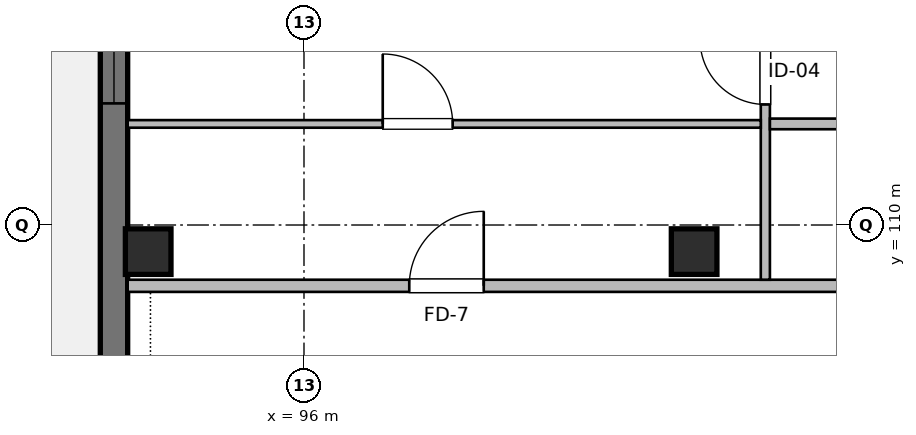
"""IFC4 building model, lengths in metres.
Left out: names, types, materials, properties, quantities, classifications, styles, units other than length and angle.
Written with IfcOpenShell. Run it as: python <this file> out.ifc"""

import sys

from ifc_helpers import new_model, si_unit, direction, frame, frame_2d, origin, origin_2d, place, context, subcontext, project, spatial, rectangle, extrude, element, fill, save


model = new_model("IFC4")
c1 = context("Model", 3, precision=1e-05, world=origin(), true_north=direction((0.0, 1.0)))
c2 = subcontext(c1, "Body", "Model", "MODEL_VIEW")
j1 = project(units=[si_unit("LENGTHUNIT", "METRE"), si_unit("PLANEANGLEUNIT", "RADIAN")], contexts=[c1])
p1 = place(None, origin())
s1 = spatial("IfcSite", under=j1, at=p1, CompositionType="ELEMENT")
p2 = place(p1, origin())
s2 = spatial("IfcBuilding", under=s1, at=p2, CompositionType="ELEMENT")
p3 = place(p2, frame((0.0, 0.0, 10.56)))
s3 = spatial("IfcBuildingStorey", under=s2, at=p3, CompositionType="ELEMENT", Elevation=10.56)
for number, where, z_axis, x_axis in (
    (1, (93.95, 109.65, 0.0), (0.0, 0.0, 1.0), (1.0, 0.0, 0.0)),
    (2, (101.133, 109.65, 0.0), (0.0, 0.0, 1.0), (1.0, 0.0, 0.0)),
):
    element("IfcColumn", number, at=place(p3, frame(where, z_axis=z_axis, x_axis=x_axis)), inside=s3, PredefinedType="COLUMN", context=c2, shape_type="SweptSolid", body=[
        extrude(rectangle(XDim=0.6, YDim=0.6, at=origin_2d()), origin(), (0.0, 0.0, 1.0), 3.2),
    ])
p4 = place(p3, frame((93.5, 100.0, 0.0), z_axis=(0.0, 0.0, 1.0), x_axis=(0.0, 1.0, 0.0)))
e3 = element("IfcWall", 3, at=p4, inside=s3, PredefinedType="SHEAR", context=c2, shape_type="SweptSolid", body=[
    extrude(rectangle(XDim=16.0, YDim=0.36, at=frame_2d((8.0, 0.0))), origin(), (0.0, 0.0, 1.0), 2.98),
])
p5 = place(p4, frame((3.4, 0.0, 0.0)))
e4 = element("IfcOpeningElement", 4, at=p5, cuts=e3, PredefinedType="OPENING", context=c2, shape_type="SweptSolid", body=[
    extrude(rectangle(XDim=1.2, YDim=2.2, at=frame_2d((0.6, 1.1))), frame((0.0, 0.19, 0.0), z_axis=(0.0, -1.0, 0.0), x_axis=(1.0, 0.0, 0.0)), (0.0, 0.0, 1.0), 0.38),
])
p6 = place(p4, frame((4.85, 0.0, 0.72)))
e5 = element("IfcOpeningElement", 5, at=p6, cuts=e3, PredefinedType="OPENING", context=c2, shape_type="SweptSolid", body=[
    extrude(rectangle(XDim=1.8, YDim=1.5, at=frame_2d((0.9, 0.75))), frame((0.0, 0.19, 0.0), z_axis=(0.0, -1.0, 0.0), x_axis=(1.0, 0.0, 0.0)), (0.0, 0.0, 1.0), 0.38),
])
p7 = place(p4, frame((11.6, 0.0, 0.72)))
e6 = element("IfcOpeningElement", 6, at=p7, cuts=e3, PredefinedType="OPENING", context=c2, shape_type="SweptSolid", body=[
    extrude(rectangle(XDim=1.7, YDim=1.5, at=frame_2d((0.85, 0.75))), frame((0.0, 0.19, 0.0), z_axis=(0.0, -1.0, 0.0), x_axis=(1.0, 0.0, 0.0)), (0.0, 0.0, 1.0), 0.38),
])
p8 = place(p3, frame((93.68, 109.2, 0.0), z_axis=(0.0, 0.0, 1.0), x_axis=(1.0, 0.0, 0.0)))
e7 = element("IfcWall", 7, at=p8, inside=s3, PredefinedType="PARTITIONING", context=c2, shape_type="SweptSolid", body=[
    extrude(rectangle(XDim=43.64, YDim=0.16, at=frame_2d((21.82, 0.0))), origin(), (0.0, 0.0, 1.0), 2.935),
])
p9 = place(p8, frame((3.705, 0.0, 0.0)))
e8 = element("IfcOpeningElement", 8, at=p9, cuts=e7, PredefinedType="OPENING", context=c2, shape_type="SweptSolid", body=[
    extrude(rectangle(XDim=0.98, YDim=2.15, at=frame_2d((0.49, 1.075))), frame((0.0, 0.09, 0.0), z_axis=(0.0, -1.0, 0.0), x_axis=(1.0, 0.0, 0.0)), (0.0, 0.0, 1.0), 0.18),
])
p10 = place(p8, frame((18.315, 0.0, 0.0)))
e9 = element("IfcOpeningElement", 9, at=p10, cuts=e7, PredefinedType="OPENING", context=c2, shape_type="SweptSolid", body=[
    extrude(rectangle(XDim=0.98, YDim=2.15, at=frame_2d((0.49, 1.075))), frame((0.0, 0.09, 0.0), z_axis=(0.0, -1.0, 0.0), x_axis=(1.0, 0.0, 0.0)), (0.0, 0.0, 1.0), 0.18),
])
p11 = place(p8, frame((32.885, 0.0, 0.0)))
e10 = element("IfcOpeningElement", 10, at=p11, cuts=e7, PredefinedType="OPENING", context=c2, shape_type="SweptSolid", body=[
    extrude(rectangle(XDim=0.98, YDim=2.15, at=frame_2d((0.49, 1.075))), frame((0.0, 0.09, 0.0), z_axis=(0.0, -1.0, 0.0), x_axis=(1.0, 0.0, 0.0)), (0.0, 0.0, 1.0), 0.18),
])
p12 = place(p3, frame((102.07, 109.28, 0.0), z_axis=(0.0, 0.0, 1.0), x_axis=(0.0, 1.0, 0.0)))
e11 = element("IfcWall", 11, at=p12, inside=s3, PredefinedType="PARTITIONING", context=c2, shape_type="SweptSolid", body=[
    extrude(rectangle(XDim=6.6, YDim=0.12, at=frame_2d((3.3, 0.0))), origin(), (0.0, 0.0, 1.0), 2.935),
])
p13 = place(p12, frame((2.306, 0.0, 0.0)))
e12 = element("IfcOpeningElement", 12, at=p13, cuts=e11, PredefinedType="OPENING", context=c2, shape_type="SweptSolid", body=[
    extrude(rectangle(XDim=0.86, YDim=2.1, at=frame_2d((0.43, 1.05))), frame((0.0, 0.07, 0.0), z_axis=(0.0, -1.0, 0.0), x_axis=(1.0, 0.0, 0.0)), (0.0, 0.0, 1.0), 0.14),
])
p14 = place(p12, frame((4.097, 0.0, 0.0)))
e13 = element("IfcOpeningElement", 13, at=p14, cuts=e11, PredefinedType="OPENING", context=c2, shape_type="SweptSolid", body=[
    extrude(rectangle(XDim=0.9, YDim=2.1, at=frame_2d((0.45, 1.05))), frame((0.0, 0.07, 0.0), z_axis=(0.0, -1.0, 0.0), x_axis=(1.0, 0.0, 0.0)), (0.0, 0.0, 1.0), 0.14),
])
p15 = place(p3, frame((102.13, 111.33, 0.0), z_axis=(0.0, 0.0, 1.0), x_axis=(1.0, 0.0, 0.0)))
e14 = element("IfcWall", 14, at=p15, inside=s3, PredefinedType="PARTITIONING", context=c2, shape_type="SweptSolid", body=[
    extrude(rectangle(XDim=6.01, YDim=0.14, at=frame_2d((3.005, 0.0))), origin(), (0.0, 0.0, 1.0), 2.935),
])
p16 = place(p15, frame((2.428, 0.0, 0.0)))
e15 = element("IfcOpeningElement", 15, at=p16, cuts=e14, PredefinedType="OPENING", context=c2, shape_type="SweptSolid", body=[
    extrude(rectangle(XDim=0.85, YDim=2.05, at=frame_2d((0.425, 1.025))), frame((0.0, 0.08, 0.0), z_axis=(0.0, -1.0, 0.0), x_axis=(1.0, 0.0, 0.0)), (0.0, 0.0, 1.0), 0.16),
])
p17 = place(p3, frame((93.68, 111.33, 0.0), z_axis=(0.0, 0.0, 1.0), x_axis=(1.0, 0.0, 0.0)))
e16 = element("IfcWall", 16, at=p17, inside=s3, PredefinedType="PARTITIONING", context=c2, shape_type="SweptSolid", body=[
    extrude(rectangle(XDim=8.33, YDim=0.1, at=frame_2d((4.165, 0.0))), origin(), (0.0, 0.0, 1.0), 2.935),
])
p18 = place(p17, frame((3.356, 0.0, 0.0)))
e17 = element("IfcOpeningElement", 17, at=p18, cuts=e16, PredefinedType="OPENING", context=c2, shape_type="SweptSolid", body=[
    extrude(rectangle(XDim=0.92, YDim=2.1, at=frame_2d((0.46, 1.05))), frame((0.0, 0.06, 0.0), z_axis=(0.0, -1.0, 0.0), x_axis=(1.0, 0.0, 0.0)), (0.0, 0.0, 1.0), 0.12),
])
p19 = place(p7, origin())
e18 = element("IfcWindow", 18, at=p19, inside=s3, PartitioningType="SINGLE_PANEL", PredefinedType="WINDOW", context=c2, shape_type="SweptSolid", body=[
    extrude(rectangle(XDim=1.7, YDim=1.5, at=frame_2d((0.85, 0.75))), frame((0.0, 0.03, 0.0), z_axis=(0.0, -1.0, 0.0), x_axis=(1.0, 0.0, 0.0)), (0.0, 0.0, 1.0), 0.06),
])
fill(e6, e18)
p20 = place(p9, origin())
e19 = element("IfcDoor", 19, at=p20, inside=s3, OperationType="SINGLE_SWING_RIGHT", PredefinedType="DOOR", context=c2, shape_type="SweptSolid", body=[
    extrude(rectangle(XDim=0.98, YDim=2.15, at=frame_2d((0.49, 1.075))), frame((0.0, 0.025, 0.0), z_axis=(0.0, -1.0, 0.0), x_axis=(1.0, 0.0, 0.0)), (0.0, 0.0, 1.0), 0.05),
])
fill(e8, e19)
p21 = place(p18, origin())
e20 = element("IfcDoor", 20, at=p21, inside=s3, OperationType="SINGLE_SWING_LEFT", PredefinedType="DOOR", context=c2, shape_type="SweptSolid", body=[
    extrude(rectangle(XDim=0.92, YDim=2.1, at=frame_2d((0.46, 1.05))), frame((0.0, 0.025, 0.0), z_axis=(0.0, -1.0, 0.0), x_axis=(1.0, 0.0, 0.0)), (0.0, 0.0, 1.0), 0.05),
])
fill(e17, e20)
p22 = place(p13, origin())
e21 = element("IfcDoor", 21, at=p22, inside=s3, OperationType="SINGLE_SWING_RIGHT", PredefinedType="DOOR", context=c2, shape_type="SweptSolid", body=[
    extrude(rectangle(XDim=0.86, YDim=2.1, at=frame_2d((0.43, 1.05))), frame((0.0, 0.025, 0.0), z_axis=(0.0, -1.0, 0.0), x_axis=(1.0, 0.0, 0.0)), (0.0, 0.0, 1.0), 0.05),
])
fill(e12, e21)
save(model, sys.argv[1])
